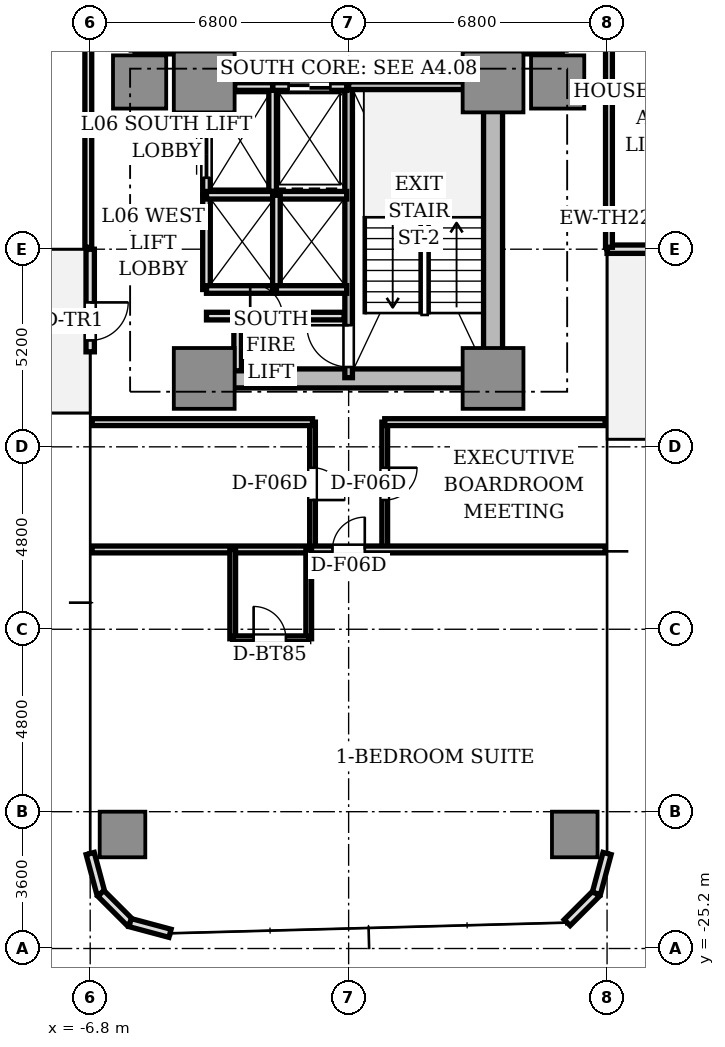
"""IFC4 building model, lengths in metres.
Left out: names, types, materials, properties, quantities, classifications, styles, units other than length and angle.
Written with IfcOpenShell. Run it as: python <this file> out.ifc"""

import sys

from ifc_helpers import new_model, si_unit, direction, frame, frame_2d, origin, origin_2d, place, context, subcontext, project, spatial, rectangle, extrude, source, transform, mapped, element, fill, save


model = new_model("IFC4")
c1 = context("Model", 3, precision=1e-05, world=origin(), true_north=direction((0.0, 1.0)))
c2 = subcontext(c1, "Body", "Model", "MODEL_VIEW")
j1 = project(units=[si_unit("LENGTHUNIT", "METRE"), si_unit("PLANEANGLEUNIT", "RADIAN")], contexts=[c1])
p1 = place(None, origin())
s1 = spatial("IfcSite", under=j1, at=p1, CompositionType="ELEMENT")
p2 = place(p1, origin())
s2 = spatial("IfcBuilding", under=s1, at=p2, CompositionType="ELEMENT")
p3 = place(p2, frame((0.0, 0.0, 26.45)))
s3 = spatial("IfcBuildingStorey", under=s2, at=p3, CompositionType="ELEMENT", Elevation=26.45)
p4 = place(p3, frame((-3.55, -10.2, 0.0), z_axis=(0.0, 0.0, 1.0), x_axis=(1.0, 0.0, 0.0)))
e1 = element("IfcWall", 1, at=p4, inside=s3, PredefinedType="SHEAR", context=c2, shape_type="SweptSolid", body=[
    extrude(rectangle(XDim=7.1, YDim=0.5, at=frame_2d((3.55, 0.0))), origin(), (0.0, 0.0, 1.0), 3.11),
])
p5 = place(p3, frame((3.8, -9.75, 0.0), z_axis=(0.0, 0.0, 1.0), x_axis=(0.0, 1.0, 0.0)))
e2 = element("IfcWall", 2, at=p5, inside=s3, PredefinedType="SHEAR", context=c2, shape_type="SweptSolid", body=[
    extrude(rectangle(XDim=6.9, YDim=0.5, at=frame_2d((3.45, 0.0))), origin(), (0.0, 0.0, 1.0), 3.11),
])
m1 = source(origin(), c2, "Body", "SweptSolid", [
    extrude(rectangle(XDim=1.6, YDim=1.6, at=origin_2d()), origin(), (0.0, 0.0, 1.0), 3.11),
])
for number, where, z_axis, x_axis in (
    (3, (-3.8, -2.4, 0.0), (0.0, 0.0, 1.0), (1.0, 0.0, 0.0)),
    (4, (3.8, -2.4, 0.0), (0.0, 0.0, 1.0), (1.0, 0.0, 0.0)),
    (5, (-3.8, -10.2, 0.0), (0.0, 0.0, 1.0), (1.0, 0.0, 0.0)),
    (6, (3.8, -10.2, 0.0), (0.0, 0.0, 1.0), (1.0, 0.0, 0.0)),
):
    element("IfcColumn", number, at=place(p3, frame(where, z_axis=z_axis, x_axis=x_axis)), inside=s3, PredefinedType="COLUMN", context=c2, shape_type="MappedRepresentation", body=[
        mapped(m1, transform((0.0, 0.0, 0.0), scale=1.0)),
    ])
m2 = source(origin(), c2, "Body", "SweptSolid", [
    extrude(rectangle(XDim=1.4, YDim=1.4, at=origin_2d()), origin(), (0.0, 0.0, 1.0), 3.11),
])
for number, where, z_axis, x_axis in (
    (7, (5.5, -2.4, 0.0), (0.0, 0.0, 1.0), (1.0, 0.0, 0.0)),
    (8, (-5.5, -2.4, 0.0), (0.0, 0.0, 1.0), (1.0, 0.0, 0.0)),
):
    element("IfcColumn", number, at=place(p3, frame(where, z_axis=z_axis, x_axis=x_axis)), inside=s3, PredefinedType="COLUMN", context=c2, shape_type="MappedRepresentation", body=[
        mapped(m2, transform((0.0, 0.0, 0.0), scale=1.0)),
    ])
m3 = source(origin(), c2, "Body", "SweptSolid", [
    extrude(rectangle(XDim=1.2, YDim=1.2, at=origin_2d()), origin(), (0.0, 0.0, 1.0), 3.11),
])
for number, where, z_axis, x_axis in (
    (9, (-5.95, -22.2, 0.0), (0.0, 0.0, 1.0), (1.0, 0.0, 0.0)),
    (10, (5.95, -22.2, 0.0), (0.0, 0.0, 1.0), (1.0, 0.0, 0.0)),
):
    element("IfcColumn", number, at=place(p3, frame(where, z_axis=z_axis, x_axis=x_axis)), inside=s3, PredefinedType="COLUMN", context=c2, shape_type="MappedRepresentation", body=[
        mapped(m3, transform((0.0, 0.0, 0.0), scale=1.0)),
    ])
p6 = place(p3, frame((6.8, -6.8, 0.0), z_axis=(0.0, 0.0, 1.0), x_axis=(1.0, 0.0, 0.0)))
e11 = element("IfcWall", 11, at=p6, inside=s3, PredefinedType="STANDARD", context=c2, shape_type="SweptSolid", body=[
    extrude(rectangle(XDim=2.7, YDim=0.22, at=frame_2d((1.35, 0.0))), origin(), (0.0, 0.0, 1.0), 3.11),
])
p7 = place(p6, frame((1.4, 0.0, 0.0)))
e12 = element("IfcOpeningElement", 12, at=p7, cuts=e11, PredefinedType="OPENING", context=c2, shape_type="SweptSolid", body=[
    extrude(rectangle(XDim=1.0, YDim=2.2, at=frame_2d((0.5, 1.1))), frame((0.0, 0.12, 0.0), z_axis=(0.0, -1.0, 0.0), x_axis=(1.0, 0.0, 0.0)), (0.0, 0.0, 1.0), 0.24),
])
p8 = place(p3, frame((-6.8, -6.8, 0.0), z_axis=(0.0, 0.0, 1.0), x_axis=(0.0, -1.0, 0.0)))
e13 = element("IfcWall", 13, at=p8, inside=s3, PredefinedType="STANDARD", context=c2, shape_type="SweptSolid", body=[
    extrude(rectangle(XDim=2.7, YDim=0.22, at=frame_2d((1.35, 0.0))), origin(), (0.0, 0.0, 1.0), 3.11),
])
p9 = place(p8, frame((1.4, 0.0, 0.0)))
e14 = element("IfcOpeningElement", 14, at=p9, cuts=e13, PredefinedType="OPENING", context=c2, shape_type="SweptSolid", body=[
    extrude(rectangle(XDim=1.0, YDim=2.2, at=frame_2d((0.5, 1.1))), frame((0.0, 0.12, 0.0), z_axis=(0.0, -1.0, 0.0), x_axis=(1.0, 0.0, 0.0)), (0.0, 0.0, 1.0), 0.24),
])
for number, where, z_axis, x_axis in (
    (15, (-6.8, -22.7, 0.0), (0.0, 0.0, 1.0), (0.259, -0.966, 0.0)),
    (16, (-6.519, -23.75, 0.0), (0.0, 0.0, 1.0), (0.707, -0.707, 0.0)),
    (17, (-5.75, -24.519, 0.0), (0.0, 0.0, 1.0), (0.966, -0.259, 0.0)),
    (18, (5.75, -24.519, 0.0), (0.0, 0.0, 1.0), (0.707, 0.707, 0.0)),
    (19, (6.519, -23.75, 0.0), (0.0, 0.0, 1.0), (0.259, 0.966, 0.0)),
):
    element("IfcWall", number, at=place(p3, frame(where, z_axis=z_axis, x_axis=x_axis)), inside=s3, PredefinedType="STANDARD", context=c2, shape_type="SweptSolid", body=[
        extrude(rectangle(XDim=1.087, YDim=0.22, at=frame_2d((0.543, 0.0))), origin(), (0.0, 0.0, 1.0), 3.11),
    ])
p10 = place(p3, frame((0.0, -10.18, 0.0), z_axis=(0.0, 0.0, 1.0), x_axis=(0.0, 1.0, 0.0)))
e20 = element("IfcWall", 20, at=p10, inside=s3, PredefinedType="SOLIDWALL", context=c2, shape_type="SweptSolid", body=[
    extrude(rectangle(XDim=7.68, YDim=0.2, at=frame_2d((3.84, 0.0))), origin(), (0.0, 0.0, 1.0), 3.11),
])
p11 = place(p10, frame((0.28, 0.0, 0.0)))
e21 = element("IfcOpeningElement", 21, at=p11, cuts=e20, PredefinedType="OPENING", context=c2, shape_type="SweptSolid", body=[
    extrude(rectangle(XDim=1.1, YDim=2.15, at=frame_2d((0.55, 1.075))), frame((0.0, 0.11, 0.0), z_axis=(0.0, -1.0, 0.0), x_axis=(1.0, 0.0, 0.0)), (0.0, 0.0, 1.0), 0.22),
])
p12 = place(p3, frame((0.0, -2.5, 0.0), z_axis=(0.0, 0.0, 1.0), x_axis=(1.0, 0.0, 0.0)))
e22 = element("IfcWall", 22, at=p12, inside=s3, PredefinedType="SOLIDWALL", context=c2, shape_type="SweptSolid", body=[
    extrude(rectangle(XDim=3.72, YDim=0.2, at=frame_2d((1.86, 0.0))), origin(), (0.0, 0.0, 1.0), 3.11),
])
p13 = place(p3, frame((-2.0, -5.28, 0.0), z_axis=(0.0, 0.0, 1.0), x_axis=(0.0, 1.0, 0.0)))
e23 = element("IfcWall", 23, at=p13, inside=s3, PredefinedType="SOLIDWALL", context=c2, shape_type="SweptSolid", body=[
    extrude(rectangle(XDim=2.78, YDim=0.2, at=frame_2d((1.39, 0.0))), origin(), (0.0, 0.0, 1.0), 2.66),
])
p14 = place(p3, frame((-2.0, -2.52, 0.0), z_axis=(0.0, 0.0, 1.0), x_axis=(1.0, 0.0, 0.0)))
e24 = element("IfcWall", 24, at=p14, inside=s3, PredefinedType="SOLIDWALL", context=c2, shape_type="SweptSolid", body=[
    extrude(rectangle(XDim=1.95, YDim=0.2, at=frame_2d((0.975, 0.0))), origin(), (0.0, 0.0, 1.0), 2.66),
])
p15 = place(p14, frame((0.42, 0.0, 0.0)))
e25 = element("IfcOpeningElement", 25, at=p15, cuts=e24, PredefinedType="OPENING", context=c2, shape_type="SweptSolid", body=[
    extrude(rectangle(XDim=1.1, YDim=2.2, at=frame_2d((0.55, 1.1))), frame((0.0, 0.11, 0.0), z_axis=(0.0, -1.0, 0.0), x_axis=(1.0, 0.0, 0.0)), (0.0, 0.0, 1.0), 0.22),
])
p16 = place(p3, frame((-3.0, -2.52, 0.0), z_axis=(0.0, 0.0, 1.0), x_axis=(1.0, 0.0, 0.0)))
e26 = element("IfcWall", 26, at=p16, inside=s3, PredefinedType="SOLIDWALL", context=c2, shape_type="SweptSolid", body=[
    extrude(rectangle(XDim=1.0, YDim=0.2, at=frame_2d((0.5, 0.0))), origin(), (0.0, 0.0, 1.0), 2.66),
])
p17 = place(p3, frame((-3.74, -5.36, 0.0), z_axis=(0.0, 0.0, 1.0), x_axis=(0.0, 1.0, 0.0)))
e27 = element("IfcWall", 27, at=p17, inside=s3, PredefinedType="SOLIDWALL", context=c2, shape_type="SweptSolid", body=[
    extrude(rectangle(XDim=2.08, YDim=0.2, at=frame_2d((1.04, 0.0))), origin(), (0.0, 0.0, 1.0), 2.66),
])
p18 = place(p17, frame((0.44, 0.0, 0.0)))
e28 = element("IfcOpeningElement", 28, at=p18, cuts=e27, PredefinedType="OPENING", context=c2, shape_type="SweptSolid", body=[
    extrude(rectangle(XDim=1.2, YDim=2.2, at=frame_2d((0.6, 1.1))), frame((0.0, 0.11, 0.0), z_axis=(0.0, -1.0, 0.0), x_axis=(1.0, 0.0, 0.0)), (0.0, 0.0, 1.0), 0.22),
])
p19 = place(p3, frame((-3.74, -7.86, 0.0), z_axis=(0.0, 0.0, 1.0), x_axis=(0.0, 1.0, 0.0)))
e29 = element("IfcWall", 29, at=p19, inside=s3, PredefinedType="SOLIDWALL", context=c2, shape_type="SweptSolid", body=[
    extrude(rectangle(XDim=2.48, YDim=0.2, at=frame_2d((1.24, 0.0))), origin(), (0.0, 0.0, 1.0), 2.66),
])
p20 = place(p3, frame((-3.74, -7.86, 0.0), z_axis=(0.0, 0.0, 1.0), x_axis=(1.0, 0.0, 0.0)))
e30 = element("IfcWall", 30, at=p20, inside=s3, PredefinedType="SOLIDWALL", context=c2, shape_type="SweptSolid", body=[
    extrude(rectangle(XDim=1.84, YDim=0.2, at=frame_2d((0.92, 0.0))), origin(), (0.0, 0.0, 1.0), 2.66),
])
p21 = place(p3, frame((-3.74, -5.38, 0.0), z_axis=(0.0, 0.0, 1.0), x_axis=(1.0, 0.0, 0.0)))
e31 = element("IfcWall", 31, at=p21, inside=s3, PredefinedType="SOLIDWALL", context=c2, shape_type="SweptSolid", body=[
    extrude(rectangle(XDim=3.69, YDim=0.2, at=frame_2d((1.845, 0.0))), origin(), (0.0, 0.0, 1.0), 2.66),
])
p22 = place(p3, frame((-1.9, -7.86, 0.0), z_axis=(0.0, 0.0, 1.0), x_axis=(0.0, 1.0, 0.0)))
e32 = element("IfcWall", 32, at=p22, inside=s3, PredefinedType="SOLIDWALL", context=c2, shape_type="SweptSolid", body=[
    extrude(rectangle(XDim=2.48, YDim=0.2, at=frame_2d((1.24, 0.0))), origin(), (0.0, 0.0, 1.0), 2.66),
])
p23 = place(p3, frame((-1.9, -7.86, 0.0), z_axis=(0.0, 0.0, 1.0), x_axis=(1.0, 0.0, 0.0)))
e33 = element("IfcWall", 33, at=p23, inside=s3, PredefinedType="SOLIDWALL", context=c2, shape_type="SweptSolid", body=[
    extrude(rectangle(XDim=1.85, YDim=0.2, at=frame_2d((0.925, 0.0))), origin(), (0.0, 0.0, 1.0), 2.66),
])
for number, where, z_axis, x_axis in (
    (34, (3.98, -1.56, 0.0), (0.0, 0.0, 1.0), (1.0, 0.0, 0.0)),
    (35, (-5.62, -1.56, 0.0), (0.0, 0.0, 1.0), (1.0, 0.0, 0.0)),
):
    element("IfcWall", number, at=place(p3, frame(where, z_axis=z_axis, x_axis=x_axis)), inside=s3, PredefinedType="SOLIDWALL", context=c2, shape_type="SweptSolid", body=[
        extrude(rectangle(XDim=1.64, YDim=0.2, at=frame_2d((0.82, 0.0))), origin(), (0.0, 0.0, 1.0), 2.66),
    ])
p24 = place(p3, frame((-3.74, -8.56, 0.0), z_axis=(0.0, 0.0, 1.0), x_axis=(1.0, 0.0, 0.0)))
e36 = element("IfcWall", 36, at=p24, inside=s3, PredefinedType="SOLIDWALL", context=c2, shape_type="SweptSolid", body=[
    extrude(rectangle(XDim=3.62, YDim=0.2, at=frame_2d((1.81, 0.0))), origin(), (0.0, 0.0, 1.0), 2.66),
])
p25 = place(p24, frame((1.15, 0.0, 0.0)))
e37 = element("IfcOpeningElement", 37, at=p25, cuts=e36, PredefinedType="OPENING", context=c2, shape_type="SweptSolid", body=[
    extrude(rectangle(XDim=0.85, YDim=2.1, at=frame_2d((0.425, 1.05))), frame((0.0, 0.11, 0.0), z_axis=(0.0, -1.0, 0.0), x_axis=(1.0, 0.0, 0.0)), (0.0, 0.0, 1.0), 0.22),
])
p26 = place(p3, frame((-2.92, -10.0, 0.0), z_axis=(0.0, 0.0, 1.0), x_axis=(0.0, 1.0, 0.0)))
e38 = element("IfcWall", 38, at=p26, inside=s3, PredefinedType="SOLIDWALL", context=c2, shape_type="SweptSolid", body=[
    extrude(rectangle(XDim=1.44, YDim=0.2, at=frame_2d((0.72, 0.0))), origin(), (0.0, 0.0, 1.0), 2.66),
])
for number, where, z_axis, x_axis in (
    (39, (6.85, -6.75, 0.0), (0.0, 0.0, 1.0), (0.0, 1.0, 0.0)),
    (40, (-6.85, -0.95, 0.0), (0.0, 0.0, 1.0), (0.0, -1.0, 0.0)),
):
    element("IfcWall", number, at=place(p3, frame(where, z_axis=z_axis, x_axis=x_axis)), inside=s3, PredefinedType="PARTITIONING", context=c2, shape_type="SweptSolid", body=[
        extrude(rectangle(XDim=5.8, YDim=0.18, at=frame_2d((2.9, 0.0))), origin(), (0.0, 0.0, 1.0), 2.66),
    ])
p27 = place(p3, frame((0.95, -11.35, 0.0), z_axis=(0.0, 0.0, 1.0), x_axis=(0.0, -1.0, 0.0)))
e41 = element("IfcWall", 41, at=p27, inside=s3, PredefinedType="PARTITIONING", context=c2, shape_type="SweptSolid", body=[
    extrude(rectangle(XDim=3.35, YDim=0.15, at=frame_2d((1.675, 0.0))), origin(), (0.0, 0.0, 1.0), 2.66),
])
p28 = place(p27, frame((1.2, 0.0, 0.0)))
e42 = element("IfcOpeningElement", 42, at=p28, cuts=e41, PredefinedType="OPENING", context=c2, shape_type="SweptSolid", body=[
    extrude(rectangle(XDim=0.85, YDim=2.1, at=frame_2d((0.425, 1.05))), frame((0.0, 0.085, 0.0), z_axis=(0.0, -1.0, 0.0), x_axis=(1.0, 0.0, 0.0)), (0.0, 0.0, 1.0), 0.17),
])
p29 = place(p3, frame((-0.95, -11.35, 0.0), z_axis=(0.0, 0.0, 1.0), x_axis=(0.0, -1.0, 0.0)))
e43 = element("IfcWall", 43, at=p29, inside=s3, PredefinedType="PARTITIONING", context=c2, shape_type="SweptSolid", body=[
    extrude(rectangle(XDim=3.35, YDim=0.15, at=frame_2d((1.675, 0.0))), origin(), (0.0, 0.0, 1.0), 2.66),
])
p30 = place(p29, frame((1.2, 0.0, 0.0)))
e44 = element("IfcOpeningElement", 44, at=p30, cuts=e43, PredefinedType="OPENING", context=c2, shape_type="SweptSolid", body=[
    extrude(rectangle(XDim=0.85, YDim=2.1, at=frame_2d((0.425, 1.05))), frame((0.0, 0.085, 0.0), z_axis=(0.0, -1.0, 0.0), x_axis=(1.0, 0.0, 0.0)), (0.0, 0.0, 1.0), 0.17),
])
for number, where, z_axis, x_axis in (
    (45, (0.95, -11.35, 0.0), (0.0, 0.0, 1.0), (1.0, 0.0, 0.0)),
    (46, (-6.75, -11.35, 0.0), (0.0, 0.0, 1.0), (1.0, 0.0, 0.0)),
):
    element("IfcWall", number, at=place(p3, frame(where, z_axis=z_axis, x_axis=x_axis)), inside=s3, PredefinedType="PARTITIONING", context=c2, shape_type="SweptSolid", body=[
        extrude(rectangle(XDim=5.8, YDim=0.18, at=frame_2d((2.9, 0.0))), origin(), (0.0, 0.0, 1.0), 2.66),
    ])
p31 = place(p3, frame((-6.75, -14.7, 0.0), z_axis=(0.0, 0.0, 1.0), x_axis=(1.0, 0.0, 0.0)))
e47 = element("IfcWall", 47, at=p31, inside=s3, PredefinedType="PARTITIONING", context=c2, shape_type="SweptSolid", body=[
    extrude(rectangle(XDim=13.5, YDim=0.18, at=frame_2d((6.75, 0.0))), origin(), (0.0, 0.0, 1.0), 2.66),
])
p32 = place(p31, frame((6.325, 0.0, 0.0)))
e48 = element("IfcOpeningElement", 48, at=p32, cuts=e47, PredefinedType="OPENING", context=c2, shape_type="SweptSolid", body=[
    extrude(rectangle(XDim=0.85, YDim=2.1, at=frame_2d((0.425, 1.05))), frame((0.0, 0.1, 0.0), z_axis=(0.0, -1.0, 0.0), x_axis=(1.0, 0.0, 0.0)), (0.0, 0.0, 1.0), 0.2),
])
for number, where, z_axis, x_axis in (
    (49, (-1.05, -14.7, 0.0), (0.0, 0.0, 1.0), (0.0, -1.0, 0.0)),
    (50, (-3.05, -14.7, 0.0), (0.0, 0.0, 1.0), (0.0, -1.0, 0.0)),
):
    element("IfcWall", number, at=place(p3, frame(where, z_axis=z_axis, x_axis=x_axis)), inside=s3, PredefinedType="PARTITIONING", context=c2, shape_type="SweptSolid", body=[
        extrude(rectangle(XDim=2.35, YDim=0.15, at=frame_2d((1.175, 0.0))), origin(), (0.0, 0.0, 1.0), 2.66),
    ])
p33 = place(p3, frame((-3.05, -17.05, 0.0), z_axis=(0.0, 0.0, 1.0), x_axis=(1.0, 0.0, 0.0)))
e51 = element("IfcWall", 51, at=p33, inside=s3, PredefinedType="PARTITIONING", context=c2, shape_type="SweptSolid", body=[
    extrude(rectangle(XDim=2.0, YDim=0.15, at=frame_2d((1.0, 0.0))), origin(), (0.0, 0.0, 1.0), 2.66),
])
p34 = place(p33, frame((0.55, 0.0, 0.0)))
e52 = element("IfcOpeningElement", 52, at=p34, cuts=e51, PredefinedType="OPENING", context=c2, shape_type="SweptSolid", body=[
    extrude(rectangle(XDim=0.85, YDim=2.1, at=frame_2d((0.425, 1.05))), frame((0.0, 0.085, 0.0), z_axis=(0.0, -1.0, 0.0), x_axis=(1.0, 0.0, 0.0)), (0.0, 0.0, 1.0), 0.17),
])
m4 = source(origin(), c2, "Body", "SweptSolid", [
    extrude(rectangle(XDim=1.0, YDim=0.05, at=origin_2d()), origin(), (0.0, 0.0, 1.0), 2.2),
])
p35 = place(p9, frame((0.5, 0.0, 0.0)))
e53 = element("IfcDoor", 53, at=p35, inside=s3, OperationType="SINGLE_SWING_LEFT", PredefinedType="DOOR", context=c2, shape_type="MappedRepresentation", body=[
    mapped(m4, transform((0.0, 0.0, 0.0), scale=1.0)),
])
fill(e14, e53)
m5 = source(origin(), c2, "Body", "SweptSolid", [
    extrude(rectangle(XDim=1.1, YDim=0.05, at=origin_2d()), origin(), (0.0, 0.0, 1.0), 2.2),
])
p36 = place(p15, frame((0.55, 0.0, 0.0)))
e54 = element("IfcDoor", 54, at=p36, inside=s3, OperationType="DOUBLE_DOOR_SLIDING", PredefinedType="DOOR", context=c2, shape_type="MappedRepresentation", body=[
    mapped(m5, transform((0.0, 0.0, 0.0), scale=1.0)),
])
fill(e25, e54)
m6 = source(origin(), c2, "Body", "SweptSolid", [
    extrude(rectangle(XDim=1.2, YDim=0.05, at=origin_2d()), origin(), (0.0, 0.0, 1.0), 2.2),
])
p37 = place(p18, frame((0.6, 0.0, 0.0)))
e55 = element("IfcDoor", 55, at=p37, inside=s3, OperationType="DOUBLE_DOOR_SLIDING", PredefinedType="DOOR", context=c2, shape_type="MappedRepresentation", body=[
    mapped(m6, transform((0.0, 0.0, 0.0), scale=1.0)),
])
fill(e28, e55)
m7 = source(origin(), c2, "Body", "SweptSolid", [
    extrude(rectangle(XDim=1.1, YDim=0.05, at=origin_2d()), origin(), (0.0, 0.0, 1.0), 2.15),
])
p38 = place(p11, frame((0.55, 0.0, 0.0)))
e56 = element("IfcDoor", 56, at=p38, inside=s3, OperationType="SINGLE_SWING_RIGHT", PredefinedType="DOOR", context=c2, shape_type="MappedRepresentation", body=[
    mapped(m7, transform((0.0, 0.0, 0.0), scale=1.0)),
])
fill(e21, e56)
m8 = source(origin(), c2, "Body", "SweptSolid", [
    extrude(rectangle(XDim=0.85, YDim=0.05, at=origin_2d()), origin(), (0.0, 0.0, 1.0), 2.1),
])
p39 = place(p25, frame((0.425, 0.0, 0.0)))
e57 = element("IfcDoor", 57, at=p39, inside=s3, OperationType="SINGLE_SWING_LEFT", PredefinedType="DOOR", context=c2, shape_type="MappedRepresentation", body=[
    mapped(m8, transform((0.0, 0.0, 0.0), scale=1.0)),
])
fill(e37, e57)
p40 = place(p28, frame((0.425, 0.0, 0.0)))
e58 = element("IfcDoor", 58, at=p40, inside=s3, OperationType="SINGLE_SWING_LEFT", PredefinedType="DOOR", context=c2, shape_type="MappedRepresentation", body=[
    mapped(m8, transform((0.0, 0.0, 0.0), scale=1.0)),
])
fill(e42, e58)
p41 = place(p30, frame((0.425, 0.0, 0.0)))
e59 = element("IfcDoor", 59, at=p41, inside=s3, OperationType="SINGLE_SWING_RIGHT", PredefinedType="DOOR", context=c2, shape_type="MappedRepresentation", body=[
    mapped(m8, transform((0.0, 0.0, 0.0), scale=1.0)),
])
fill(e44, e59)
p42 = place(p34, frame((0.425, 0.0, 0.0)))
e60 = element("IfcDoor", 60, at=p42, inside=s3, OperationType="SINGLE_SWING_LEFT", PredefinedType="DOOR", context=c2, shape_type="MappedRepresentation", body=[
    mapped(m8, transform((0.0, 0.0, 0.0), scale=1.0)),
])
fill(e52, e60)
p43 = place(p32, frame((0.425, 0.0, 0.0)))
e61 = element("IfcDoor", 61, at=p43, inside=s3, OperationType="SINGLE_SWING_RIGHT", PredefinedType="DOOR", context=c2, shape_type="MappedRepresentation", body=[
    mapped(m8, transform((0.0, 0.0, 0.0), scale=1.0)),
])
fill(e48, e61)
save(model, sys.argv[1])
